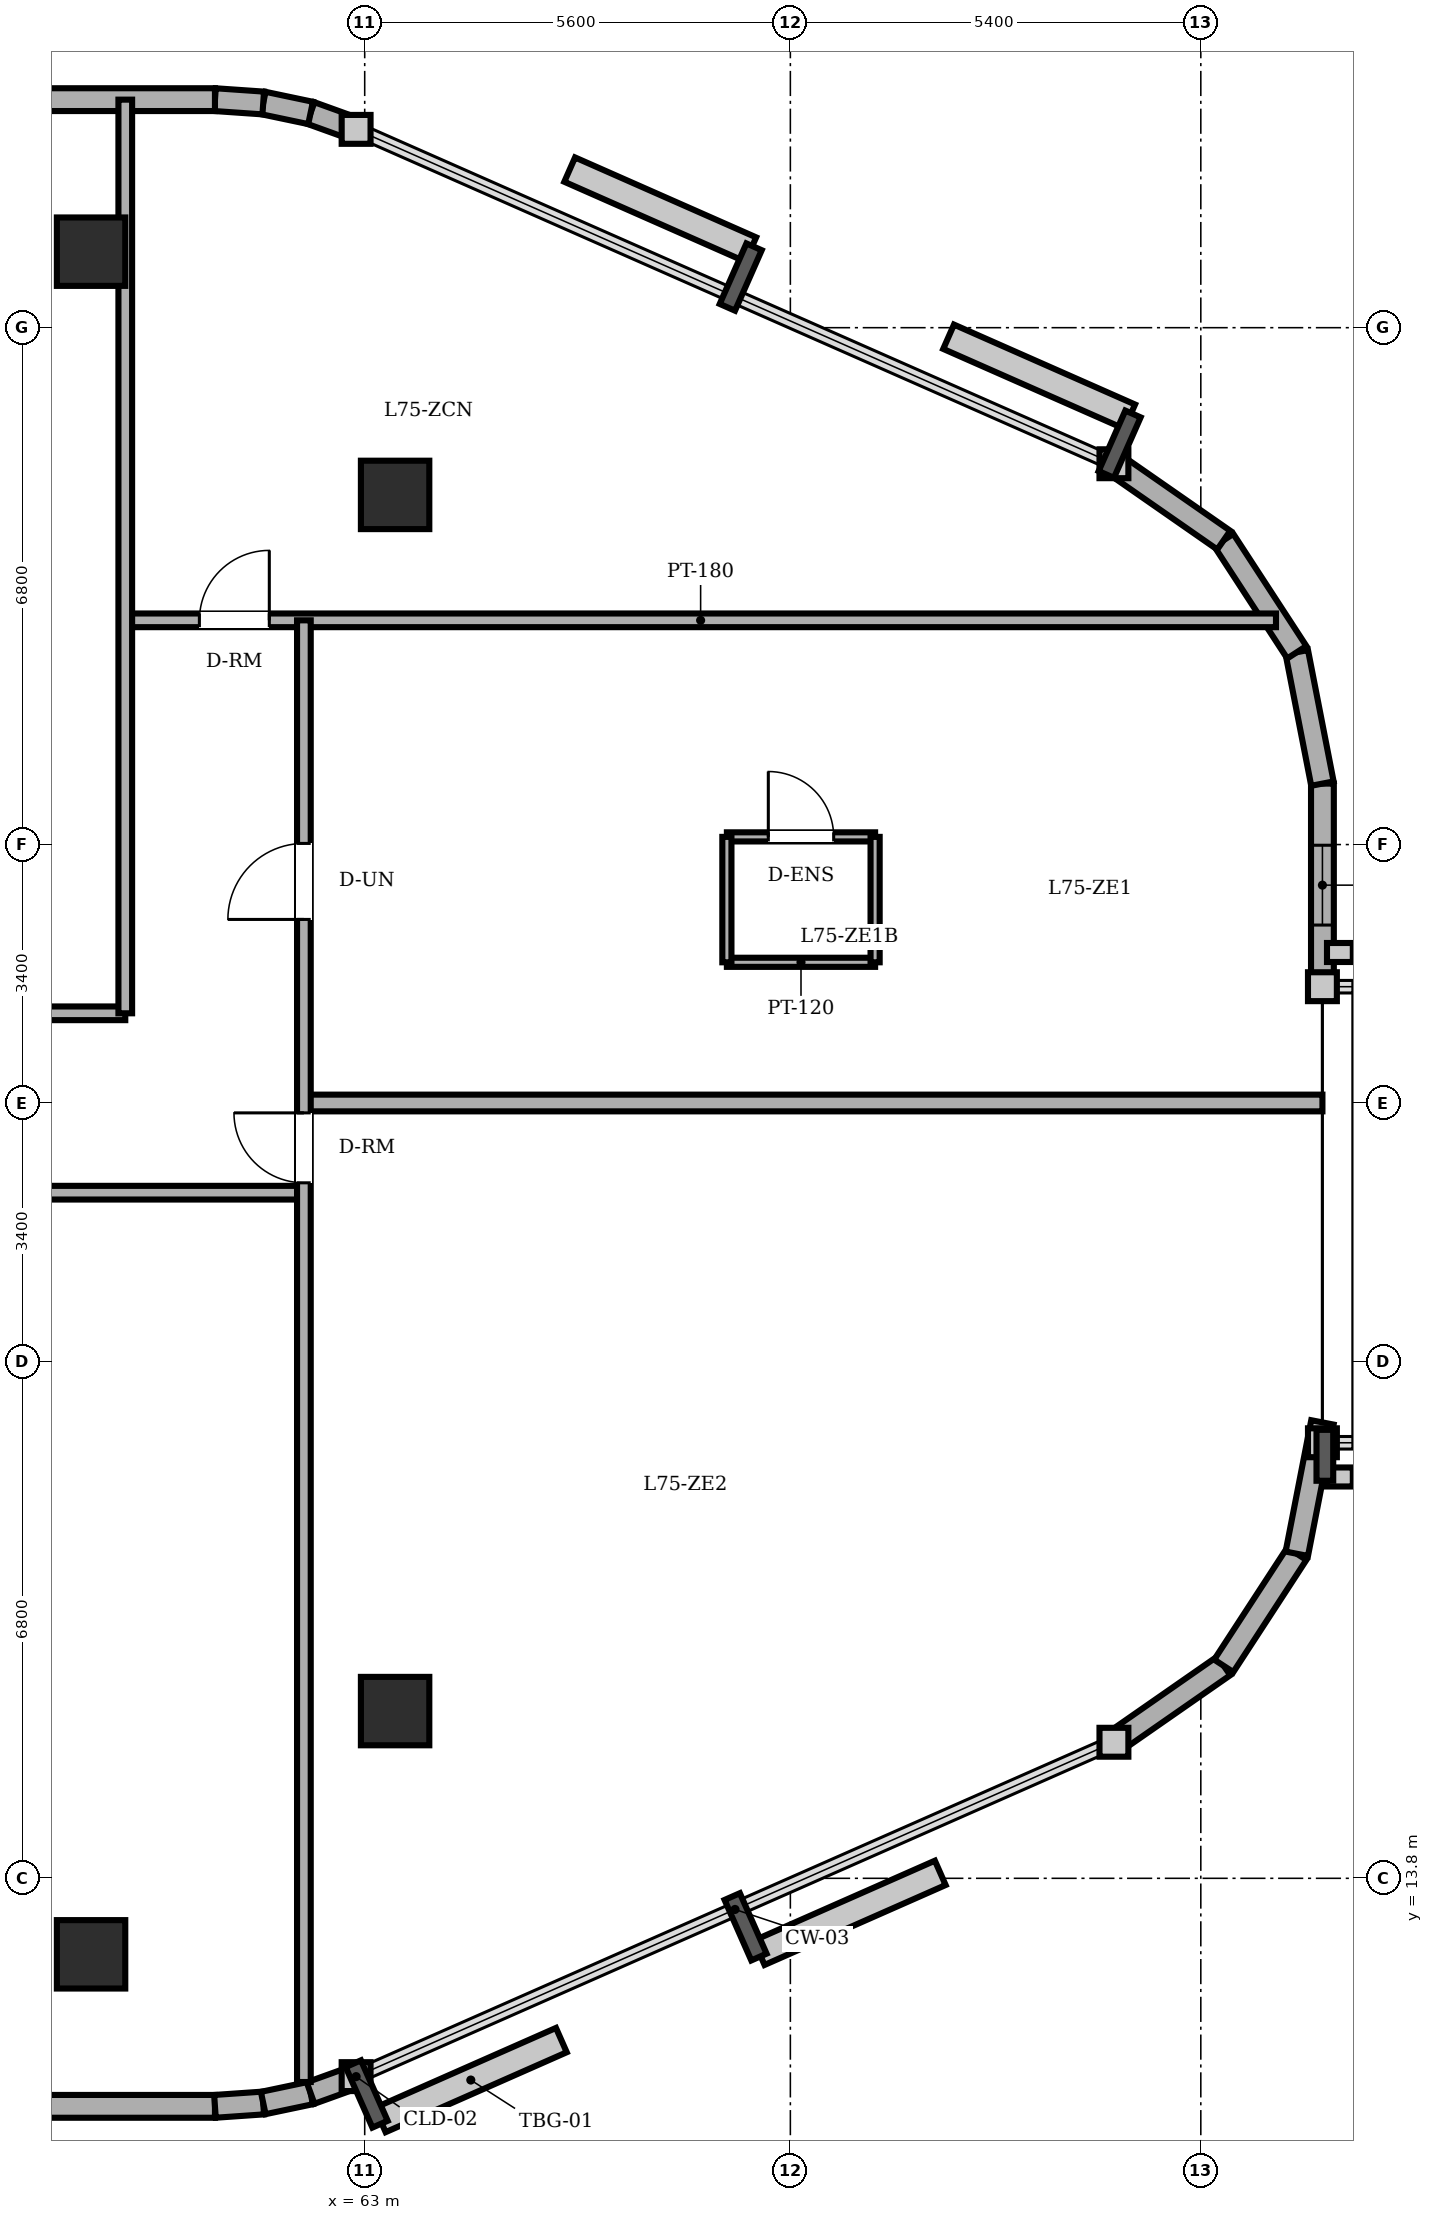
"""IFC4 building model, lengths in metres.
Left out: names, types, materials, properties, quantities, classifications, styles, units other than length and angle.
Written with IfcOpenShell. Run it as: python <this file> out.ifc"""

import sys

from ifc_helpers import new_model, si_unit, direction, frame, frame_2d, origin, origin_2d, place, context, subcontext, project, spatial, rectangle, circle, extrude, element, fill, save


model = new_model("IFC4")
c1 = context("Model", 3, precision=1e-05, world=origin(), true_north=direction((0.0, 1.0)))
c2 = subcontext(c1, "Body", "Model", "MODEL_VIEW")
j1 = project(units=[si_unit("LENGTHUNIT", "METRE"), si_unit("PLANEANGLEUNIT", "RADIAN")], contexts=[c1])
p1 = place(None, origin())
s1 = spatial("IfcSite", under=j1, at=p1, CompositionType="ELEMENT")
p2 = place(p1, origin())
s2 = spatial("IfcBuilding", under=s1, at=p2, CompositionType="ELEMENT")
p3 = place(p2, frame((0.0, 0.0, 288.0)))
s3 = spatial("IfcBuildingStorey", under=s2, at=p3, CompositionType="ELEMENT", Elevation=288.0)
for number, where, z_axis, x_axis in (
    (1, (59.4, 12.8, 0.0), (0.0, 0.0, 1.0), (1.0, 0.0, 0.0)),
    (2, (63.4, 16.0, 0.0), (0.0, 0.0, 1.0), (1.0, 0.0, 0.0)),
    (3, (63.4, 32.0, 0.0), (0.0, 0.0, 1.0), (1.0, 0.0, 0.0)),
    (4, (59.4, 35.2, 0.0), (0.0, 0.0, 1.0), (1.0, 0.0, 0.0)),
):
    element("IfcColumn", number, at=place(p3, frame(where, z_axis=z_axis, x_axis=x_axis)), inside=s3, PredefinedType="COLUMN", context=c2, shape_type="SweptSolid", body=[
        extrude(circle(Radius=0.45, at=origin_2d()), origin(), (0.0, 0.0, 1.0), 3.65),
    ])
p4 = place(p3, frame((24.0, 10.8, 0.0), z_axis=(0.0, 0.0, 1.0), x_axis=(1.0, 0.0, 0.0)))
e5 = element("IfcWall", 5, at=p4, inside=s3, PredefinedType="SOLIDWALL", context=c2, shape_type="SweptSolid", body=[
    extrude(rectangle(XDim=37.03, YDim=0.3, at=frame_2d((18.515, 0.0))), origin(), (0.0, 0.0, 1.0), 3.45),
])
p5 = place(p4, frame((10.925, 0.0, 0.0)))
e6 = element("IfcOpeningElement", 6, at=p5, cuts=e5, PredefinedType="OPENING", context=c2, shape_type="SweptSolid", body=[
    extrude(rectangle(XDim=0.95, YDim=2.2, at=frame_2d((0.475, 1.1))), frame((0.0, 0.16, 0.0), z_axis=(0.0, -1.0, 0.0), x_axis=(1.0, 0.0, 0.0)), (0.0, 0.0, 1.0), 0.32),
])
p6 = place(p4, frame((4.917, 0.0, 0.85)))
e7 = element("IfcOpeningElement", 7, at=p6, cuts=e5, PredefinedType="OPENING", context=c2, shape_type="SweptSolid", body=[
    extrude(rectangle(XDim=1.2, YDim=1.6, at=frame_2d((0.6, 0.8))), frame((0.0, 0.16, 0.0), z_axis=(0.0, -1.0, 0.0), x_axis=(1.0, 0.0, 0.0)), (0.0, 0.0, 1.0), 0.32),
])
p7 = place(p4, frame((22.193, 0.0, 0.85)))
e8 = element("IfcOpeningElement", 8, at=p7, cuts=e5, PredefinedType="OPENING", context=c2, shape_type="SweptSolid", body=[
    extrude(rectangle(XDim=1.2, YDim=1.6, at=frame_2d((0.6, 0.8))), frame((0.0, 0.16, 0.0), z_axis=(0.0, -1.0, 0.0), x_axis=(1.0, 0.0, 0.0)), (0.0, 0.0, 1.0), 0.32),
])
p8 = place(p4, frame((29.137, 0.0, 0.85)))
e9 = element("IfcOpeningElement", 9, at=p8, cuts=e5, PredefinedType="OPENING", context=c2, shape_type="SweptSolid", body=[
    extrude(rectangle(XDim=1.2, YDim=1.6, at=frame_2d((0.6, 0.8))), frame((0.0, 0.16, 0.0), z_axis=(0.0, -1.0, 0.0), x_axis=(1.0, 0.0, 0.0)), (0.0, 0.0, 1.0), 0.32),
])
p9 = place(p3, frame((61.03, 10.8, 0.0), z_axis=(0.0, 0.0, 1.0), x_axis=(0.997613959688, 0.069039028352, 0.0)))
e10 = element("IfcWall", 10, at=p9, inside=s3, PredefinedType="SOLIDWALL", context=c2, shape_type="SweptSolid", body=[
    extrude(rectangle(XDim=0.636, YDim=0.3, at=frame_2d((0.318, 0.0))), origin(), (0.0, 0.0, 1.0), 3.45),
])
p10 = place(p3, frame((61.665, 10.844, 0.0), z_axis=(0.0, 0.0, 1.0), x_axis=(0.97857012251, 0.205913854149, 0.0)))
e11 = element("IfcWall", 11, at=p10, inside=s3, PredefinedType="SOLIDWALL", context=c2, shape_type="SweptSolid", body=[
    extrude(rectangle(XDim=0.637, YDim=0.3, at=frame_2d((0.318, 0.0))), origin(), (0.0, 0.0, 1.0), 3.45),
])
p11 = place(p3, frame((62.288, 10.975, 0.0), z_axis=(0.0, 0.0, 1.0), x_axis=(0.94077491148, 0.339031806665, 0.0)))
e12 = element("IfcWall", 12, at=p11, inside=s3, PredefinedType="SOLIDWALL", context=c2, shape_type="SweptSolid", body=[
    extrude(rectangle(XDim=0.636, YDim=0.3, at=frame_2d((0.318, 0.0))), origin(), (0.0, 0.0, 1.0), 3.45),
])
p12 = place(p3, frame((72.857, 15.59, 0.0), z_axis=(0.0, 0.0, 1.0), x_axis=(0.821006966142, 0.570918174124, 0.0)))
e13 = element("IfcWall", 13, at=p12, inside=s3, PredefinedType="SOLIDWALL", context=c2, shape_type="SweptSolid", body=[
    extrude(rectangle(XDim=1.76, YDim=0.3, at=frame_2d((0.88, 0.0))), origin(), (0.0, 0.0, 1.0), 3.45),
])
for number, where, z_axis, x_axis in (
    (14, (74.302, 16.595, 0.0), (0.0, 0.0, 1.0), (0.546, 0.838, 0.0)),
    (15, (75.263, 18.07, 0.0), (0.0, 0.0, 1.0), (0.192, 0.981, 0.0)),
):
    element("IfcWall", number, at=place(p3, frame(where, z_axis=z_axis, x_axis=x_axis)), inside=s3, PredefinedType="SOLIDWALL", context=c2, shape_type="SweptSolid", body=[
        extrude(rectangle(XDim=1.76, YDim=0.3, at=frame_2d((0.88, 0.0))), origin(), (0.0, 0.0, 1.0), 3.45),
    ])
p13 = place(p3, frame((75.6, 25.53, 0.0), z_axis=(0.0, 0.0, 1.0), x_axis=(0.0, 1.0, 0.0)))
e16 = element("IfcWall", 16, at=p13, inside=s3, PredefinedType="SOLIDWALL", context=c2, shape_type="SweptSolid", body=[
    extrude(rectangle(XDim=2.672, YDim=0.3, at=frame_2d((1.336, 0.0))), origin(), (0.0, 0.0, 1.0), 3.45),
])
p14 = place(p13, frame((0.811, 0.0, 0.85)))
e17 = element("IfcOpeningElement", 17, at=p14, cuts=e16, PredefinedType="OPENING", context=c2, shape_type="SweptSolid", body=[
    extrude(rectangle(XDim=1.05, YDim=1.55, at=frame_2d((0.525, 0.775))), frame((0.0, 0.16, 0.0), z_axis=(0.0, -1.0, 0.0), x_axis=(1.0, 0.0, 0.0)), (0.0, 0.0, 1.0), 0.32),
])
for number, where, z_axis, x_axis in (
    (18, (75.6, 28.202, 0.0), (0.0, 0.0, 1.0), (-0.192, 0.981, 0.0)),
    (19, (75.263, 29.93, 0.0), (0.0, 0.0, 1.0), (-0.546, 0.838, 0.0)),
):
    element("IfcWall", number, at=place(p3, frame(where, z_axis=z_axis, x_axis=x_axis)), inside=s3, PredefinedType="SOLIDWALL", context=c2, shape_type="SweptSolid", body=[
        extrude(rectangle(XDim=1.76, YDim=0.3, at=frame_2d((0.88, 0.0))), origin(), (0.0, 0.0, 1.0), 3.45),
    ])
p15 = place(p3, frame((74.302, 31.405, 0.0), z_axis=(0.0, 0.0, 1.0), x_axis=(-0.821006966142, 0.570918174124, 0.0)))
e20 = element("IfcWall", 20, at=p15, inside=s3, PredefinedType="SOLIDWALL", context=c2, shape_type="SweptSolid", body=[
    extrude(rectangle(XDim=1.76, YDim=0.3, at=frame_2d((0.88, 0.0))), origin(), (0.0, 0.0, 1.0), 3.45),
])
p16 = place(p3, frame((62.887, 36.809, 0.0), z_axis=(0.0, 0.0, 1.0), x_axis=(-0.94077491148, 0.339031806665, 0.0)))
e21 = element("IfcWall", 21, at=p16, inside=s3, PredefinedType="SOLIDWALL", context=c2, shape_type="SweptSolid", body=[
    extrude(rectangle(XDim=0.636, YDim=0.3, at=frame_2d((0.318, 0.0))), origin(), (0.0, 0.0, 1.0), 3.45),
])
p17 = place(p3, frame((62.288, 37.025, 0.0), z_axis=(0.0, 0.0, 1.0), x_axis=(-0.97857012251, 0.205913854149, 0.0)))
e22 = element("IfcWall", 22, at=p17, inside=s3, PredefinedType="SOLIDWALL", context=c2, shape_type="SweptSolid", body=[
    extrude(rectangle(XDim=0.637, YDim=0.3, at=frame_2d((0.318, 0.0))), origin(), (0.0, 0.0, 1.0), 3.45),
])
p18 = place(p3, frame((61.665, 37.156, 0.0), z_axis=(0.0, 0.0, 1.0), x_axis=(-0.997613959688, 0.069039028352, 0.0)))
e23 = element("IfcWall", 23, at=p18, inside=s3, PredefinedType="SOLIDWALL", context=c2, shape_type="SweptSolid", body=[
    extrude(rectangle(XDim=0.636, YDim=0.3, at=frame_2d((0.318, 0.0))), origin(), (0.0, 0.0, 1.0), 3.45),
])
p19 = place(p3, frame((61.03, 37.2, 0.0), z_axis=(0.0, 0.0, 1.0), x_axis=(-1.0, 0.0, 0.0)))
e24 = element("IfcWall", 24, at=p19, inside=s3, PredefinedType="SOLIDWALL", context=c2, shape_type="SweptSolid", body=[
    extrude(rectangle(XDim=37.03, YDim=0.3, at=frame_2d((18.515, 0.0))), origin(), (0.0, 0.0, 1.0), 3.45),
])
p20 = place(p19, frame((29.655, 0.0, 0.0)))
e25 = element("IfcOpeningElement", 25, at=p20, cuts=e24, PredefinedType="OPENING", context=c2, shape_type="SweptSolid", body=[
    extrude(rectangle(XDim=0.95, YDim=2.2, at=frame_2d((0.475, 1.1))), frame((0.0, 0.16, 0.0), z_axis=(0.0, -1.0, 0.0), x_axis=(1.0, 0.0, 0.0)), (0.0, 0.0, 1.0), 0.32),
])
p21 = place(p19, frame((7.247, 0.0, 0.85)))
e26 = element("IfcOpeningElement", 26, at=p21, cuts=e24, PredefinedType="OPENING", context=c2, shape_type="SweptSolid", body=[
    extrude(rectangle(XDim=1.2, YDim=1.6, at=frame_2d((0.6, 0.8))), frame((0.0, 0.16, 0.0), z_axis=(0.0, -1.0, 0.0), x_axis=(1.0, 0.0, 0.0)), (0.0, 0.0, 1.0), 0.32),
])
p22 = place(p19, frame((13.913, 0.0, 0.85)))
e27 = element("IfcOpeningElement", 27, at=p22, cuts=e24, PredefinedType="OPENING", context=c2, shape_type="SweptSolid", body=[
    extrude(rectangle(XDim=1.2, YDim=1.6, at=frame_2d((0.6, 0.8))), frame((0.0, 0.16, 0.0), z_axis=(0.0, -1.0, 0.0), x_axis=(1.0, 0.0, 0.0)), (0.0, 0.0, 1.0), 0.32),
])
p23 = place(p19, frame((25.747, 0.0, 0.85)))
e28 = element("IfcOpeningElement", 28, at=p23, cuts=e24, PredefinedType="OPENING", context=c2, shape_type="SweptSolid", body=[
    extrude(rectangle(XDim=1.2, YDim=1.6, at=frame_2d((0.6, 0.8))), frame((0.0, 0.16, 0.0), z_axis=(0.0, -1.0, 0.0), x_axis=(1.0, 0.0, 0.0)), (0.0, 0.0, 1.0), 0.32),
])
p24 = place(p19, frame((30.913, 0.0, 0.85)))
e29 = element("IfcOpeningElement", 29, at=p24, cuts=e24, PredefinedType="OPENING", context=c2, shape_type="SweptSolid", body=[
    extrude(rectangle(XDim=1.2, YDim=1.6, at=frame_2d((0.6, 0.8))), frame((0.0, 0.16, 0.0), z_axis=(0.0, -1.0, 0.0), x_axis=(1.0, 0.0, 0.0)), (0.0, 0.0, 1.0), 0.32),
])
p25 = place(p3, frame((67.765, 27.501, 0.0), z_axis=(0.0, 0.0, 1.0), x_axis=(1.0, 0.0, 0.0)))
e30 = element("IfcWall", 30, at=p25, inside=s3, PredefinedType="PARTITIONING", context=c2, shape_type="SweptSolid", body=[
    extrude(rectangle(XDim=1.95, YDim=0.12, at=frame_2d((0.975, 0.0))), origin(), (0.0, 0.0, 1.0), 3.45),
])
p26 = place(p25, frame((0.545, 0.0, 0.0)))
e31 = element("IfcOpeningElement", 31, at=p26, cuts=e30, PredefinedType="OPENING", context=c2, shape_type="SweptSolid", body=[
    extrude(rectangle(XDim=0.86, YDim=2.1, at=frame_2d((0.43, 1.05))), frame((0.0, 0.07, 0.0), z_axis=(0.0, -1.0, 0.0), x_axis=(1.0, 0.0, 0.0)), (0.0, 0.0, 1.0), 0.14),
])
p27 = place(p3, frame((69.715, 25.851, 0.0), z_axis=(0.0, 0.0, 1.0), x_axis=(-1.0, 0.0, 0.0)))
e32 = element("IfcWall", 32, at=p27, inside=s3, PredefinedType="PARTITIONING", context=c2, shape_type="SweptSolid", body=[
    extrude(rectangle(XDim=1.95, YDim=0.12, at=frame_2d((0.975, 0.0))), origin(), (0.0, 0.0, 1.0), 3.45),
])
for number, where, z_axis, x_axis in (
    (33, (67.765, 27.501, 0.0), (0.0, 0.0, 1.0), (0.0, -1.0, 0.0)),
    (34, (69.715, 25.851, 0.0), (0.0, 0.0, 1.0), (0.0, 1.0, 0.0)),
):
    element("IfcWall", number, at=place(p3, frame(where, z_axis=z_axis, x_axis=x_axis)), inside=s3, PredefinedType="PARTITIONING", context=c2, shape_type="SweptSolid", body=[
        extrude(rectangle(XDim=1.65, YDim=0.12, at=frame_2d((0.825, 0.0))), origin(), (0.0, 0.0, 1.0), 3.45),
    ])
p28 = place(p3, frame((39.85, 22.82, 0.0), z_axis=(0.0, 0.0, 1.0), x_axis=(1.0, 0.0, 0.0)))
e35 = element("IfcWall", 35, at=p28, inside=s3, PredefinedType="PARTITIONING", context=c2, shape_type="SweptSolid", body=[
    extrude(rectangle(XDim=22.35, YDim=0.18, at=frame_2d((11.175, 0.0))), origin(), (0.0, 0.0, 1.0), 3.45),
])
p29 = place(p28, frame((10.715, 0.0, 0.0)))
e36 = element("IfcOpeningElement", 36, at=p29, cuts=e35, PredefinedType="OPENING", context=c2, shape_type="SweptSolid", body=[
    extrude(rectangle(XDim=0.92, YDim=2.1, at=frame_2d((0.46, 1.05))), frame((0.0, 0.1, 0.0), z_axis=(0.0, -1.0, 0.0), x_axis=(1.0, 0.0, 0.0)), (0.0, 0.0, 1.0), 0.2),
])
p30 = place(p3, frame((62.2, 24.0, 0.0), z_axis=(0.0, 0.0, 1.0), x_axis=(1.0, 0.0, 0.0)))
e37 = element("IfcWall", 37, at=p30, inside=s3, PredefinedType="PARTITIONING", context=c2, shape_type="SweptSolid", body=[
    extrude(rectangle(XDim=13.4, YDim=0.22, at=frame_2d((6.7, 0.0))), origin(), (0.0, 0.0, 1.0), 3.232),
])
p31 = place(p3, frame((39.85, 25.18, 0.0), z_axis=(0.0, 0.0, 1.0), x_axis=(1.0, 0.0, 0.0)))
e38 = element("IfcWall", 38, at=p31, inside=s3, PredefinedType="PARTITIONING", context=c2, shape_type="SweptSolid", body=[
    extrude(rectangle(XDim=20.0, YDim=0.18, at=frame_2d((10.0, 0.0))), origin(), (0.0, 0.0, 1.0), 3.45),
])
p32 = place(p31, frame((9.54, 0.0, 0.0)))
e39 = element("IfcOpeningElement", 39, at=p32, cuts=e38, PredefinedType="OPENING", context=c2, shape_type="SweptSolid", body=[
    extrude(rectangle(XDim=0.92, YDim=2.1, at=frame_2d((0.46, 1.05))), frame((0.0, 0.1, 0.0), z_axis=(0.0, -1.0, 0.0), x_axis=(1.0, 0.0, 0.0)), (0.0, 0.0, 1.0), 0.2),
])
p33 = place(p3, frame((59.85, 30.35, 0.0), z_axis=(0.0, 0.0, 1.0), x_axis=(1.0, 0.0, 0.0)))
e40 = element("IfcWall", 40, at=p33, inside=s3, PredefinedType="PARTITIONING", context=c2, shape_type="SweptSolid", body=[
    extrude(rectangle(XDim=15.139, YDim=0.18, at=frame_2d((7.569, 0.0))), origin(), (0.0, 0.0, 1.0), 3.45),
])
p34 = place(p33, frame((0.975, 0.0, 0.0)))
e41 = element("IfcOpeningElement", 41, at=p34, cuts=e40, PredefinedType="OPENING", context=c2, shape_type="SweptSolid", body=[
    extrude(rectangle(XDim=0.92, YDim=2.1, at=frame_2d((0.46, 1.05))), frame((0.0, 0.1, 0.0), z_axis=(0.0, -1.0, 0.0), x_axis=(1.0, 0.0, 0.0)), (0.0, 0.0, 1.0), 0.2),
])
p35 = place(p3, frame((59.85, 25.18, 0.0), z_axis=(0.0, 0.0, 1.0), x_axis=(0.0, 1.0, 0.0)))
e42 = element("IfcWall", 42, at=p35, inside=s3, PredefinedType="PARTITIONING", context=c2, shape_type="SweptSolid", body=[
    extrude(rectangle(XDim=12.02, YDim=0.18, at=frame_2d((6.01, 0.0))), origin(), (0.0, 0.0, 1.0), 3.45),
])
p36 = place(p3, frame((62.2, 11.12, 0.0), z_axis=(0.0, 0.0, 1.0), x_axis=(0.0, 1.0, 0.0)))
e43 = element("IfcWall", 43, at=p36, inside=s3, PredefinedType="PARTITIONING", context=c2, shape_type="SweptSolid", body=[
    extrude(rectangle(XDim=19.23, YDim=0.18, at=frame_2d((9.615, 0.0))), origin(), (0.0, 0.0, 1.0), 3.45),
])
p37 = place(p36, frame((15.295, 0.0, 0.0)))
e44 = element("IfcOpeningElement", 44, at=p37, cuts=e43, PredefinedType="OPENING", context=c2, shape_type="SweptSolid", body=[
    extrude(rectangle(XDim=1.0, YDim=2.15, at=frame_2d((0.5, 1.075))), frame((0.0, 0.1, 0.0), z_axis=(0.0, -1.0, 0.0), x_axis=(1.0, 0.0, 0.0)), (0.0, 0.0, 1.0), 0.2),
])
p38 = place(p36, frame((11.83, 0.0, 0.0)))
e45 = element("IfcOpeningElement", 45, at=p38, cuts=e43, PredefinedType="OPENING", context=c2, shape_type="SweptSolid", body=[
    extrude(rectangle(XDim=0.92, YDim=2.1, at=frame_2d((0.46, 1.05))), frame((0.0, 0.1, 0.0), z_axis=(0.0, -1.0, 0.0), x_axis=(1.0, 0.0, 0.0)), (0.0, 0.0, 1.0), 0.2),
])
p39 = place(p14, origin())
e46 = element("IfcWindow", 46, at=p39, inside=s3, PartitioningType="SINGLE_PANEL", PredefinedType="WINDOW", context=c2, shape_type="SweptSolid", body=[
    extrude(rectangle(XDim=1.05, YDim=1.55, at=frame_2d((0.525, 0.775))), frame((0.0, 0.03, 0.0), z_axis=(0.0, -1.0, 0.0), x_axis=(1.0, 0.0, 0.0)), (0.0, 0.0, 1.0), 0.06),
])
fill(e17, e46)
p40 = place(p26, origin())
e47 = element("IfcDoor", 47, at=p40, inside=s3, OperationType="SINGLE_SWING_LEFT", PredefinedType="DOOR", context=c2, shape_type="SweptSolid", body=[
    extrude(rectangle(XDim=0.86, YDim=2.1, at=frame_2d((0.43, 1.05))), frame((0.0, 0.025, 0.0), z_axis=(0.0, -1.0, 0.0), x_axis=(1.0, 0.0, 0.0)), (0.0, 0.0, 1.0), 0.05),
])
fill(e31, e47)
p41 = place(p34, origin())
e48 = element("IfcDoor", 48, at=p41, inside=s3, OperationType="SINGLE_SWING_RIGHT", PredefinedType="DOOR", context=c2, shape_type="SweptSolid", body=[
    extrude(rectangle(XDim=0.92, YDim=2.1, at=frame_2d((0.46, 1.05))), frame((0.0, 0.025, 0.0), z_axis=(0.0, -1.0, 0.0), x_axis=(1.0, 0.0, 0.0)), (0.0, 0.0, 1.0), 0.05),
])
fill(e41, e48)
p42 = place(p37, origin())
e49 = element("IfcDoor", 49, at=p42, inside=s3, OperationType="SINGLE_SWING_LEFT", PredefinedType="DOOR", context=c2, shape_type="SweptSolid", body=[
    extrude(rectangle(XDim=1.0, YDim=2.15, at=frame_2d((0.5, 1.075))), frame((0.0, 0.025, 0.0), z_axis=(0.0, -1.0, 0.0), x_axis=(1.0, 0.0, 0.0)), (0.0, 0.0, 1.0), 0.05),
])
fill(e44, e49)
p43 = place(p38, origin())
e50 = element("IfcDoor", 50, at=p43, inside=s3, OperationType="SINGLE_SWING_RIGHT", PredefinedType="DOOR", context=c2, shape_type="SweptSolid", body=[
    extrude(rectangle(XDim=0.92, YDim=2.1, at=frame_2d((0.46, 1.05))), frame((0.0, 0.025, 0.0), z_axis=(0.0, -1.0, 0.0), x_axis=(1.0, 0.0, 0.0)), (0.0, 0.0, 1.0), 0.05),
])
fill(e45, e50)
save(model, sys.argv[1])
